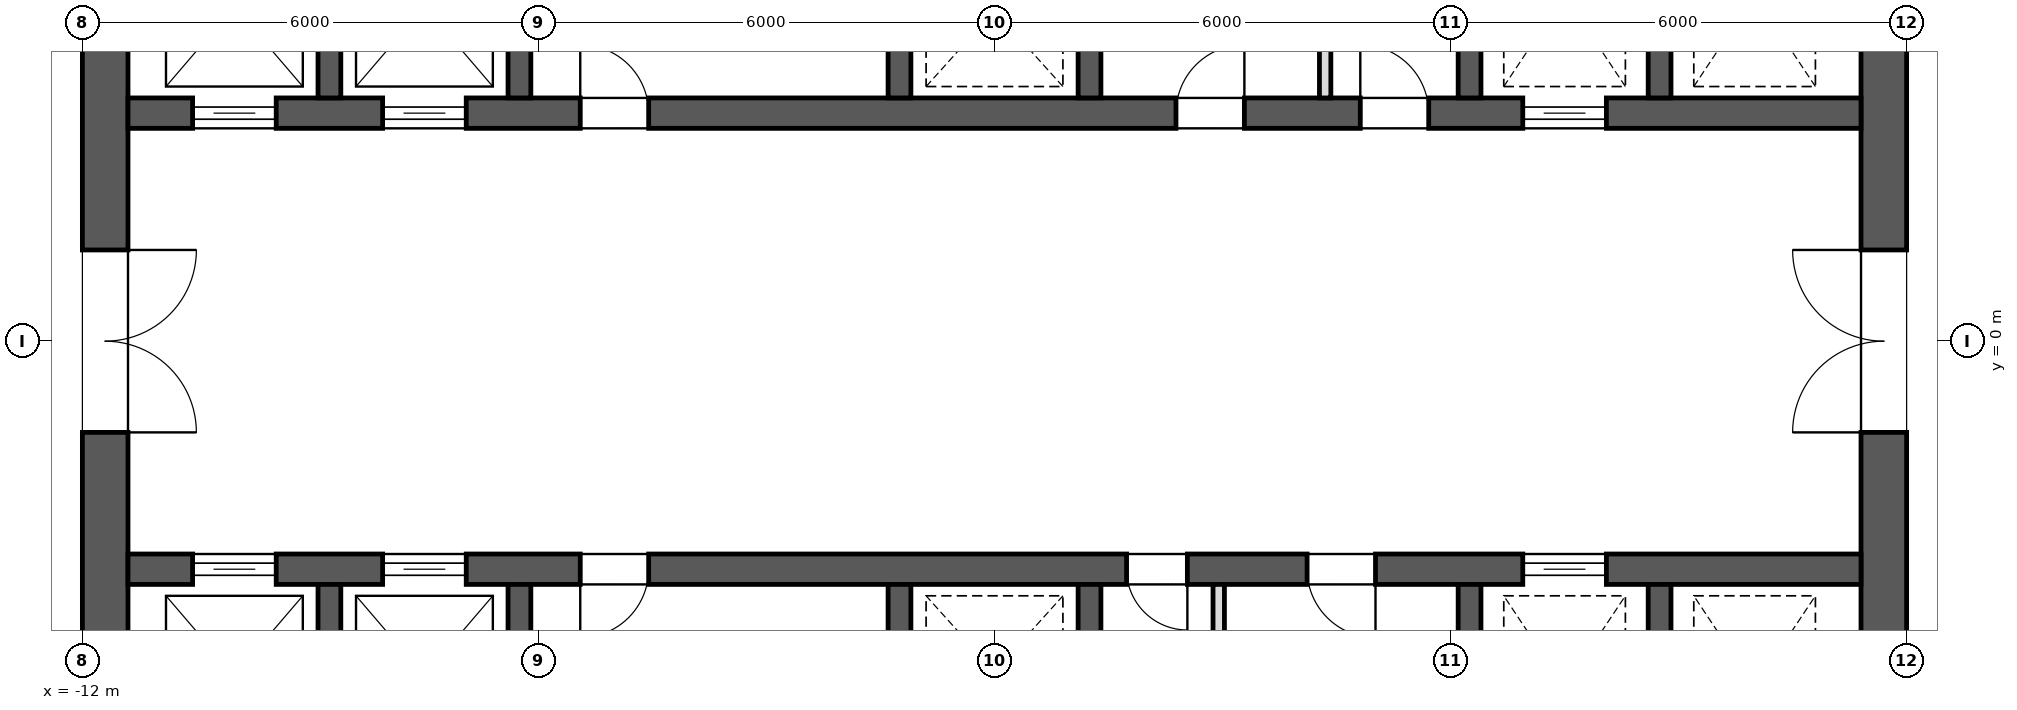
"""IFC4 building model, lengths in metres.
Left out: names, types, materials, properties, quantities, classifications, styles, units other than length and angle.
Written with IfcOpenShell. Run it as: python <this file> out.ifc"""

import sys

from ifc_helpers import new_model, si_unit, direction, frame, frame_2d, origin, place, context, subcontext, project, spatial, rectangle, extrude, element, fill, save


model = new_model("IFC4")
c1 = context("Model", 3, precision=1e-05, world=origin(), true_north=direction((0.0, 1.0)))
c2 = subcontext(c1, "Body", "Model", "MODEL_VIEW")
j1 = project(units=[si_unit("LENGTHUNIT", "METRE"), si_unit("PLANEANGLEUNIT", "RADIAN")], contexts=[c1])
p1 = place(None, origin())
s1 = spatial("IfcSite", under=j1, at=p1, CompositionType="ELEMENT")
p2 = place(p1, origin())
s2 = spatial("IfcBuilding", under=s1, at=p2, CompositionType="ELEMENT")
p3 = place(p2, frame((0.0, 0.0, 264.3)))
s3 = spatial("IfcBuildingStorey", under=s2, at=p3, CompositionType="ELEMENT", Elevation=264.3)
p4 = place(p3, frame((11.7, -11.4, 0.0), z_axis=(0.0, 0.0, 1.0), x_axis=(0.0, 1.0, 0.0)))
e1 = element("IfcWall", 1, at=p4, inside=s3, PredefinedType="SHEAR", context=c2, shape_type="SweptSolid", body=[
    extrude(rectangle(XDim=22.8, YDim=0.6, at=frame_2d((11.4, 0.0))), origin(), (0.0, 0.0, 1.0), 4.0),
])
p5 = place(p4, frame((10.2, 0.0, 0.0)))
e2 = element("IfcOpeningElement", 2, at=p5, cuts=e1, PredefinedType="OPENING", context=c2, shape_type="SweptSolid", body=[
    extrude(rectangle(XDim=2.4, YDim=2.1, at=frame_2d((1.2, 1.05))), frame((0.0, 0.312, 0.0), z_axis=(0.0, -1.0, 0.0), x_axis=(1.0, 0.0, 0.0)), (0.0, 0.0, 1.0), 0.624),
])
p6 = place(p4, frame((19.5, 0.0, 0.0)))
e3 = element("IfcOpeningElement", 3, at=p6, cuts=e1, PredefinedType="OPENING", context=c2, shape_type="SweptSolid", body=[
    extrude(rectangle(XDim=1.2, YDim=2.1, at=frame_2d((0.6, 1.05))), frame((0.0, 0.312, 0.0), z_axis=(0.0, -1.0, 0.0), x_axis=(1.0, 0.0, 0.0)), (0.0, 0.0, 1.0), 0.624),
])
p7 = place(p4, frame((2.1, 0.0, 0.0)))
e4 = element("IfcOpeningElement", 4, at=p7, cuts=e1, PredefinedType="OPENING", context=c2, shape_type="SweptSolid", body=[
    extrude(rectangle(XDim=1.2, YDim=2.1, at=frame_2d((0.6, 1.05))), frame((0.0, 0.312, 0.0), z_axis=(0.0, -1.0, 0.0), x_axis=(1.0, 0.0, 0.0)), (0.0, 0.0, 1.0), 0.624),
])
p8 = place(p3, frame((-11.7, -11.4, 0.0), z_axis=(0.0, 0.0, 1.0), x_axis=(0.0, 1.0, 0.0)))
e5 = element("IfcWall", 5, at=p8, inside=s3, PredefinedType="SHEAR", context=c2, shape_type="SweptSolid", body=[
    extrude(rectangle(XDim=22.8, YDim=0.6, at=frame_2d((11.4, 0.0))), origin(), (0.0, 0.0, 1.0), 4.0),
])
p9 = place(p8, frame((10.2, 0.0, 0.0)))
e6 = element("IfcOpeningElement", 6, at=p9, cuts=e5, PredefinedType="OPENING", context=c2, shape_type="SweptSolid", body=[
    extrude(rectangle(XDim=2.4, YDim=2.1, at=frame_2d((1.2, 1.05))), frame((0.0, 0.312, 0.0), z_axis=(0.0, -1.0, 0.0), x_axis=(1.0, 0.0, 0.0)), (0.0, 0.0, 1.0), 0.624),
])
p10 = place(p8, frame((18.925, 0.0, 0.0)))
e7 = element("IfcOpeningElement", 7, at=p10, cuts=e5, PredefinedType="OPENING", context=c2, shape_type="SweptSolid", body=[
    extrude(rectangle(XDim=1.2, YDim=2.1, at=frame_2d((0.6, 1.05))), frame((0.0, 0.312, 0.0), z_axis=(0.0, -1.0, 0.0), x_axis=(1.0, 0.0, 0.0)), (0.0, 0.0, 1.0), 0.624),
])
p11 = place(p8, frame((2.675, 0.0, 0.0)))
e8 = element("IfcOpeningElement", 8, at=p11, cuts=e5, PredefinedType="OPENING", context=c2, shape_type="SweptSolid", body=[
    extrude(rectangle(XDim=1.2, YDim=2.1, at=frame_2d((0.6, 1.05))), frame((0.0, 0.312, 0.0), z_axis=(0.0, -1.0, 0.0), x_axis=(1.0, 0.0, 0.0)), (0.0, 0.0, 1.0), 0.624),
])
p12 = place(p3, frame((-11.4, 3.0, 0.0), z_axis=(0.0, 0.0, 1.0), x_axis=(1.0, 0.0, 0.0)))
e9 = element("IfcWall", 9, at=p12, inside=s3, PredefinedType="SHEAR", context=c2, shape_type="SweptSolid", body=[
    extrude(rectangle(XDim=22.8, YDim=0.4, at=frame_2d((11.4, 0.0))), origin(), (0.0, 0.0, 1.0), 4.0),
])
p13 = place(p12, frame((0.85, 0.0, 0.0)))
e10 = element("IfcOpeningElement", 10, at=p13, cuts=e9, PredefinedType="OPENING", context=c2, shape_type="SweptSolid", body=[
    extrude(rectangle(XDim=1.1, YDim=2.1, at=frame_2d((0.55, 1.05))), frame((0.0, 0.212, 0.0), z_axis=(0.0, -1.0, 0.0), x_axis=(1.0, 0.0, 0.0)), (0.0, 0.0, 1.0), 0.424),
])
p14 = place(p12, frame((3.35, 0.0, 0.0)))
e11 = element("IfcOpeningElement", 11, at=p14, cuts=e9, PredefinedType="OPENING", context=c2, shape_type="SweptSolid", body=[
    extrude(rectangle(XDim=1.1, YDim=2.1, at=frame_2d((0.55, 1.05))), frame((0.0, 0.212, 0.0), z_axis=(0.0, -1.0, 0.0), x_axis=(1.0, 0.0, 0.0)), (0.0, 0.0, 1.0), 0.424),
])
p15 = place(p12, frame((18.35, 0.0, 0.0)))
e12 = element("IfcOpeningElement", 12, at=p15, cuts=e9, PredefinedType="OPENING", context=c2, shape_type="SweptSolid", body=[
    extrude(rectangle(XDim=1.1, YDim=2.1, at=frame_2d((0.55, 1.05))), frame((0.0, 0.212, 0.0), z_axis=(0.0, -1.0, 0.0), x_axis=(1.0, 0.0, 0.0)), (0.0, 0.0, 1.0), 0.424),
])
p16 = place(p12, frame((13.788, 0.0, 0.0)))
e13 = element("IfcOpeningElement", 13, at=p16, cuts=e9, PredefinedType="OPENING", context=c2, shape_type="SweptSolid", body=[
    extrude(rectangle(XDim=0.9, YDim=2.1, at=frame_2d((0.45, 1.05))), frame((0.0, 0.212, 0.0), z_axis=(0.0, -1.0, 0.0), x_axis=(1.0, 0.0, 0.0)), (0.0, 0.0, 1.0), 0.424),
])
p17 = place(p12, frame((16.212, 0.0, 0.0)))
e14 = element("IfcOpeningElement", 14, at=p17, cuts=e9, PredefinedType="OPENING", context=c2, shape_type="SweptSolid", body=[
    extrude(rectangle(XDim=0.9, YDim=2.1, at=frame_2d((0.45, 1.05))), frame((0.0, 0.212, 0.0), z_axis=(0.0, -1.0, 0.0), x_axis=(1.0, 0.0, 0.0)), (0.0, 0.0, 1.0), 0.424),
])
p18 = place(p12, frame((5.95, 0.0, 0.0)))
e15 = element("IfcOpeningElement", 15, at=p18, cuts=e9, PredefinedType="OPENING", context=c2, shape_type="SweptSolid", body=[
    extrude(rectangle(XDim=0.9, YDim=2.1, at=frame_2d((0.45, 1.05))), frame((0.0, 0.212, 0.0), z_axis=(0.0, -1.0, 0.0), x_axis=(1.0, 0.0, 0.0)), (0.0, 0.0, 1.0), 0.424),
])
for number, where, z_axis, x_axis in (
    (16, (-8.75, 3.2, 0.0), (0.0, 0.0, 1.0), (0.0, 1.0, 0.0)),
    (17, (-6.25, 3.2, 0.0), (0.0, 0.0, 1.0), (0.0, 1.0, 0.0)),
    (18, (-1.25, 3.2, 0.0), (0.0, 0.0, 1.0), (0.0, 1.0, 0.0)),
    (19, (1.25, 3.2, 0.0), (0.0, 0.0, 1.0), (0.0, 1.0, 0.0)),
    (20, (6.25, 3.2, 0.0), (0.0, 0.0, 1.0), (0.0, 1.0, 0.0)),
    (21, (8.75, 3.2, 0.0), (0.0, 0.0, 1.0), (0.0, 1.0, 0.0)),
):
    element("IfcWall", number, at=place(p3, frame(where, z_axis=z_axis, x_axis=x_axis)), inside=s3, PredefinedType="SHEAR", context=c2, shape_type="SweptSolid", body=[
        extrude(rectangle(XDim=2.9, YDim=0.3, at=frame_2d((1.45, 0.0))), origin(), (0.0, 0.0, 1.0), 4.0),
    ])
p19 = place(p3, frame((-11.4, -3.0, 0.0), z_axis=(0.0, 0.0, 1.0), x_axis=(1.0, 0.0, 0.0)))
e22 = element("IfcWall", 22, at=p19, inside=s3, PredefinedType="SHEAR", context=c2, shape_type="SweptSolid", body=[
    extrude(rectangle(XDim=22.8, YDim=0.4, at=frame_2d((11.4, 0.0))), origin(), (0.0, 0.0, 1.0), 4.0),
])
p20 = place(p19, frame((0.85, 0.0, 0.0)))
e23 = element("IfcOpeningElement", 23, at=p20, cuts=e22, PredefinedType="OPENING", context=c2, shape_type="SweptSolid", body=[
    extrude(rectangle(XDim=1.1, YDim=2.1, at=frame_2d((0.55, 1.05))), frame((0.0, 0.212, 0.0), z_axis=(0.0, -1.0, 0.0), x_axis=(1.0, 0.0, 0.0)), (0.0, 0.0, 1.0), 0.424),
])
p21 = place(p19, frame((3.35, 0.0, 0.0)))
e24 = element("IfcOpeningElement", 24, at=p21, cuts=e22, PredefinedType="OPENING", context=c2, shape_type="SweptSolid", body=[
    extrude(rectangle(XDim=1.1, YDim=2.1, at=frame_2d((0.55, 1.05))), frame((0.0, 0.212, 0.0), z_axis=(0.0, -1.0, 0.0), x_axis=(1.0, 0.0, 0.0)), (0.0, 0.0, 1.0), 0.424),
])
p22 = place(p19, frame((18.35, 0.0, 0.0)))
e25 = element("IfcOpeningElement", 25, at=p22, cuts=e22, PredefinedType="OPENING", context=c2, shape_type="SweptSolid", body=[
    extrude(rectangle(XDim=1.1, YDim=2.1, at=frame_2d((0.55, 1.05))), frame((0.0, 0.212, 0.0), z_axis=(0.0, -1.0, 0.0), x_axis=(1.0, 0.0, 0.0)), (0.0, 0.0, 1.0), 0.424),
])
p23 = place(p19, frame((13.137, 0.0, 0.0)))
e26 = element("IfcOpeningElement", 26, at=p23, cuts=e22, PredefinedType="OPENING", context=c2, shape_type="SweptSolid", body=[
    extrude(rectangle(XDim=0.8, YDim=2.1, at=frame_2d((0.4, 1.05))), frame((0.0, 0.212, 0.0), z_axis=(0.0, -1.0, 0.0), x_axis=(1.0, 0.0, 0.0)), (0.0, 0.0, 1.0), 0.424),
])
p24 = place(p19, frame((15.512, 0.0, 0.0)))
e27 = element("IfcOpeningElement", 27, at=p24, cuts=e22, PredefinedType="OPENING", context=c2, shape_type="SweptSolid", body=[
    extrude(rectangle(XDim=0.9, YDim=2.1, at=frame_2d((0.45, 1.05))), frame((0.0, 0.212, 0.0), z_axis=(0.0, -1.0, 0.0), x_axis=(1.0, 0.0, 0.0)), (0.0, 0.0, 1.0), 0.424),
])
p25 = place(p19, frame((5.95, 0.0, 0.0)))
e28 = element("IfcOpeningElement", 28, at=p25, cuts=e22, PredefinedType="OPENING", context=c2, shape_type="SweptSolid", body=[
    extrude(rectangle(XDim=0.9, YDim=2.1, at=frame_2d((0.45, 1.05))), frame((0.0, 0.212, 0.0), z_axis=(0.0, -1.0, 0.0), x_axis=(1.0, 0.0, 0.0)), (0.0, 0.0, 1.0), 0.424),
])
for number, where, z_axis, x_axis in (
    (29, (-8.75, -6.1, 0.0), (0.0, 0.0, 1.0), (0.0, 1.0, 0.0)),
    (30, (-6.25, -6.1, 0.0), (0.0, 0.0, 1.0), (0.0, 1.0, 0.0)),
    (31, (-1.25, -6.1, 0.0), (0.0, 0.0, 1.0), (0.0, 1.0, 0.0)),
    (32, (1.25, -6.1, 0.0), (0.0, 0.0, 1.0), (0.0, 1.0, 0.0)),
    (33, (6.25, -6.1, 0.0), (0.0, 0.0, 1.0), (0.0, 1.0, 0.0)),
    (34, (8.75, -6.1, 0.0), (0.0, 0.0, 1.0), (0.0, 1.0, 0.0)),
):
    element("IfcWall", number, at=place(p3, frame(where, z_axis=z_axis, x_axis=x_axis)), inside=s3, PredefinedType="SHEAR", context=c2, shape_type="SweptSolid", body=[
        extrude(rectangle(XDim=2.9, YDim=0.3, at=frame_2d((1.45, 0.0))), origin(), (0.0, 0.0, 1.0), 4.0),
    ])
for number, where, z_axis, x_axis in (
    (35, (4.35, 3.2, 0.0), (0.0, 0.0, 1.0), (0.0, 1.0, 0.0)),
    (36, (2.95, -6.1, 0.0), (0.0, 0.0, 1.0), (0.0, 1.0, 0.0)),
):
    element("IfcWall", number, at=place(p3, frame(where, z_axis=z_axis, x_axis=x_axis)), inside=s3, PredefinedType="PARTITIONING", context=c2, shape_type="SweptSolid", body=[
        extrude(rectangle(XDim=2.9, YDim=0.15, at=frame_2d((1.45, 0.0))), origin(), (0.0, 0.0, 1.0), 3.7),
    ])
p26 = place(p13, origin())
e37 = element("IfcDoor", 37, at=p26, inside=s3, OperationType="SLIDING_TO_LEFT", PredefinedType="DOOR", context=c2, shape_type="SweptSolid", body=[
    extrude(rectangle(XDim=1.1, YDim=2.1, at=frame_2d((0.55, 1.05))), frame((0.0, 0.025, 0.0), z_axis=(0.0, -1.0, 0.0), x_axis=(1.0, 0.0, 0.0)), (0.0, 0.0, 1.0), 0.05),
])
fill(e10, e37)
p27 = place(p14, origin())
e38 = element("IfcDoor", 38, at=p27, inside=s3, OperationType="SLIDING_TO_LEFT", PredefinedType="DOOR", context=c2, shape_type="SweptSolid", body=[
    extrude(rectangle(XDim=1.1, YDim=2.1, at=frame_2d((0.55, 1.05))), frame((0.0, 0.025, 0.0), z_axis=(0.0, -1.0, 0.0), x_axis=(1.0, 0.0, 0.0)), (0.0, 0.0, 1.0), 0.05),
])
fill(e11, e38)
p28 = place(p20, origin())
e39 = element("IfcDoor", 39, at=p28, inside=s3, OperationType="SLIDING_TO_LEFT", PredefinedType="DOOR", context=c2, shape_type="SweptSolid", body=[
    extrude(rectangle(XDim=1.1, YDim=2.1, at=frame_2d((0.55, 1.05))), frame((0.0, 0.025, 0.0), z_axis=(0.0, -1.0, 0.0), x_axis=(1.0, 0.0, 0.0)), (0.0, 0.0, 1.0), 0.05),
])
fill(e23, e39)
p29 = place(p21, origin())
e40 = element("IfcDoor", 40, at=p29, inside=s3, OperationType="SLIDING_TO_LEFT", PredefinedType="DOOR", context=c2, shape_type="SweptSolid", body=[
    extrude(rectangle(XDim=1.1, YDim=2.1, at=frame_2d((0.55, 1.05))), frame((0.0, 0.025, 0.0), z_axis=(0.0, -1.0, 0.0), x_axis=(1.0, 0.0, 0.0)), (0.0, 0.0, 1.0), 0.05),
])
fill(e24, e40)
p30 = place(p15, origin())
e41 = element("IfcDoor", 41, at=p30, inside=s3, OperationType="SLIDING_TO_LEFT", PredefinedType="DOOR", context=c2, shape_type="SweptSolid", body=[
    extrude(rectangle(XDim=1.1, YDim=2.1, at=frame_2d((0.55, 1.05))), frame((0.0, 0.025, 0.0), z_axis=(0.0, -1.0, 0.0), x_axis=(1.0, 0.0, 0.0)), (0.0, 0.0, 1.0), 0.05),
])
fill(e12, e41)
p31 = place(p22, origin())
e42 = element("IfcDoor", 42, at=p31, inside=s3, OperationType="SLIDING_TO_LEFT", PredefinedType="DOOR", context=c2, shape_type="SweptSolid", body=[
    extrude(rectangle(XDim=1.1, YDim=2.1, at=frame_2d((0.55, 1.05))), frame((0.0, 0.025, 0.0), z_axis=(0.0, -1.0, 0.0), x_axis=(1.0, 0.0, 0.0)), (0.0, 0.0, 1.0), 0.05),
])
fill(e25, e42)
p32 = place(p9, frame((2.4, 0.0, 0.0), z_axis=(0.0, 0.0, 1.0), x_axis=(-1.0, 0.0, 0.0)))
e43 = element("IfcDoor", 43, at=p32, inside=s3, OperationType="DOUBLE_DOOR_SINGLE_SWING", PredefinedType="DOOR", context=c2, shape_type="SweptSolid", body=[
    extrude(rectangle(XDim=2.4, YDim=2.1, at=frame_2d((1.2, 1.05))), frame((0.0, 0.025, 0.0), z_axis=(0.0, -1.0, 0.0), x_axis=(1.0, 0.0, 0.0)), (0.0, 0.0, 1.0), 0.05),
])
fill(e6, e43)
p33 = place(p5, origin())
e44 = element("IfcDoor", 44, at=p33, inside=s3, OperationType="DOUBLE_DOOR_SINGLE_SWING", PredefinedType="DOOR", context=c2, shape_type="SweptSolid", body=[
    extrude(rectangle(XDim=2.4, YDim=2.1, at=frame_2d((1.2, 1.05))), frame((0.0, 0.025, 0.0), z_axis=(0.0, -1.0, 0.0), x_axis=(1.0, 0.0, 0.0)), (0.0, 0.0, 1.0), 0.05),
])
fill(e2, e44)
p34 = place(p16, origin())
e45 = element("IfcDoor", 45, at=p34, inside=s3, OperationType="SINGLE_SWING_LEFT", PredefinedType="DOOR", context=c2, shape_type="SweptSolid", body=[
    extrude(rectangle(XDim=0.9, YDim=2.1, at=frame_2d((0.45, 1.05))), frame((0.0, 0.025, 0.0), z_axis=(0.0, -1.0, 0.0), x_axis=(1.0, 0.0, 0.0)), (0.0, 0.0, 1.0), 0.05),
])
fill(e13, e45)
p35 = place(p17, origin())
e46 = element("IfcDoor", 46, at=p35, inside=s3, OperationType="SINGLE_SWING_RIGHT", PredefinedType="DOOR", context=c2, shape_type="SweptSolid", body=[
    extrude(rectangle(XDim=0.9, YDim=2.1, at=frame_2d((0.45, 1.05))), frame((0.0, 0.025, 0.0), z_axis=(0.0, -1.0, 0.0), x_axis=(1.0, 0.0, 0.0)), (0.0, 0.0, 1.0), 0.05),
])
fill(e14, e46)
p36 = place(p18, origin())
e47 = element("IfcDoor", 47, at=p36, inside=s3, OperationType="SINGLE_SWING_RIGHT", PredefinedType="DOOR", context=c2, shape_type="SweptSolid", body=[
    extrude(rectangle(XDim=0.9, YDim=2.1, at=frame_2d((0.45, 1.05))), frame((0.0, 0.025, 0.0), z_axis=(0.0, -1.0, 0.0), x_axis=(1.0, 0.0, 0.0)), (0.0, 0.0, 1.0), 0.05),
])
fill(e15, e47)
p37 = place(p23, frame((0.8, 0.0, 0.0), z_axis=(0.0, 0.0, 1.0), x_axis=(-1.0, 0.0, 0.0)))
e48 = element("IfcDoor", 48, at=p37, inside=s3, OperationType="SINGLE_SWING_RIGHT", PredefinedType="DOOR", context=c2, shape_type="SweptSolid", body=[
    extrude(rectangle(XDim=0.8, YDim=2.1, at=frame_2d((0.4, 1.05))), frame((0.0, 0.025, 0.0), z_axis=(0.0, -1.0, 0.0), x_axis=(1.0, 0.0, 0.0)), (0.0, 0.0, 1.0), 0.05),
])
fill(e26, e48)
p38 = place(p24, frame((0.9, 0.0, 0.0), z_axis=(0.0, 0.0, 1.0), x_axis=(-1.0, 0.0, 0.0)))
e49 = element("IfcDoor", 49, at=p38, inside=s3, OperationType="SINGLE_SWING_RIGHT", PredefinedType="DOOR", context=c2, shape_type="SweptSolid", body=[
    extrude(rectangle(XDim=0.9, YDim=2.1, at=frame_2d((0.45, 1.05))), frame((0.0, 0.025, 0.0), z_axis=(0.0, -1.0, 0.0), x_axis=(1.0, 0.0, 0.0)), (0.0, 0.0, 1.0), 0.05),
])
fill(e27, e49)
p39 = place(p25, frame((0.9, 0.0, 0.0), z_axis=(0.0, 0.0, 1.0), x_axis=(-1.0, 0.0, 0.0)))
e50 = element("IfcDoor", 50, at=p39, inside=s3, OperationType="SINGLE_SWING_LEFT", PredefinedType="DOOR", context=c2, shape_type="SweptSolid", body=[
    extrude(rectangle(XDim=0.9, YDim=2.1, at=frame_2d((0.45, 1.05))), frame((0.0, 0.025, 0.0), z_axis=(0.0, -1.0, 0.0), x_axis=(1.0, 0.0, 0.0)), (0.0, 0.0, 1.0), 0.05),
])
fill(e28, e50)
save(model, sys.argv[1])
